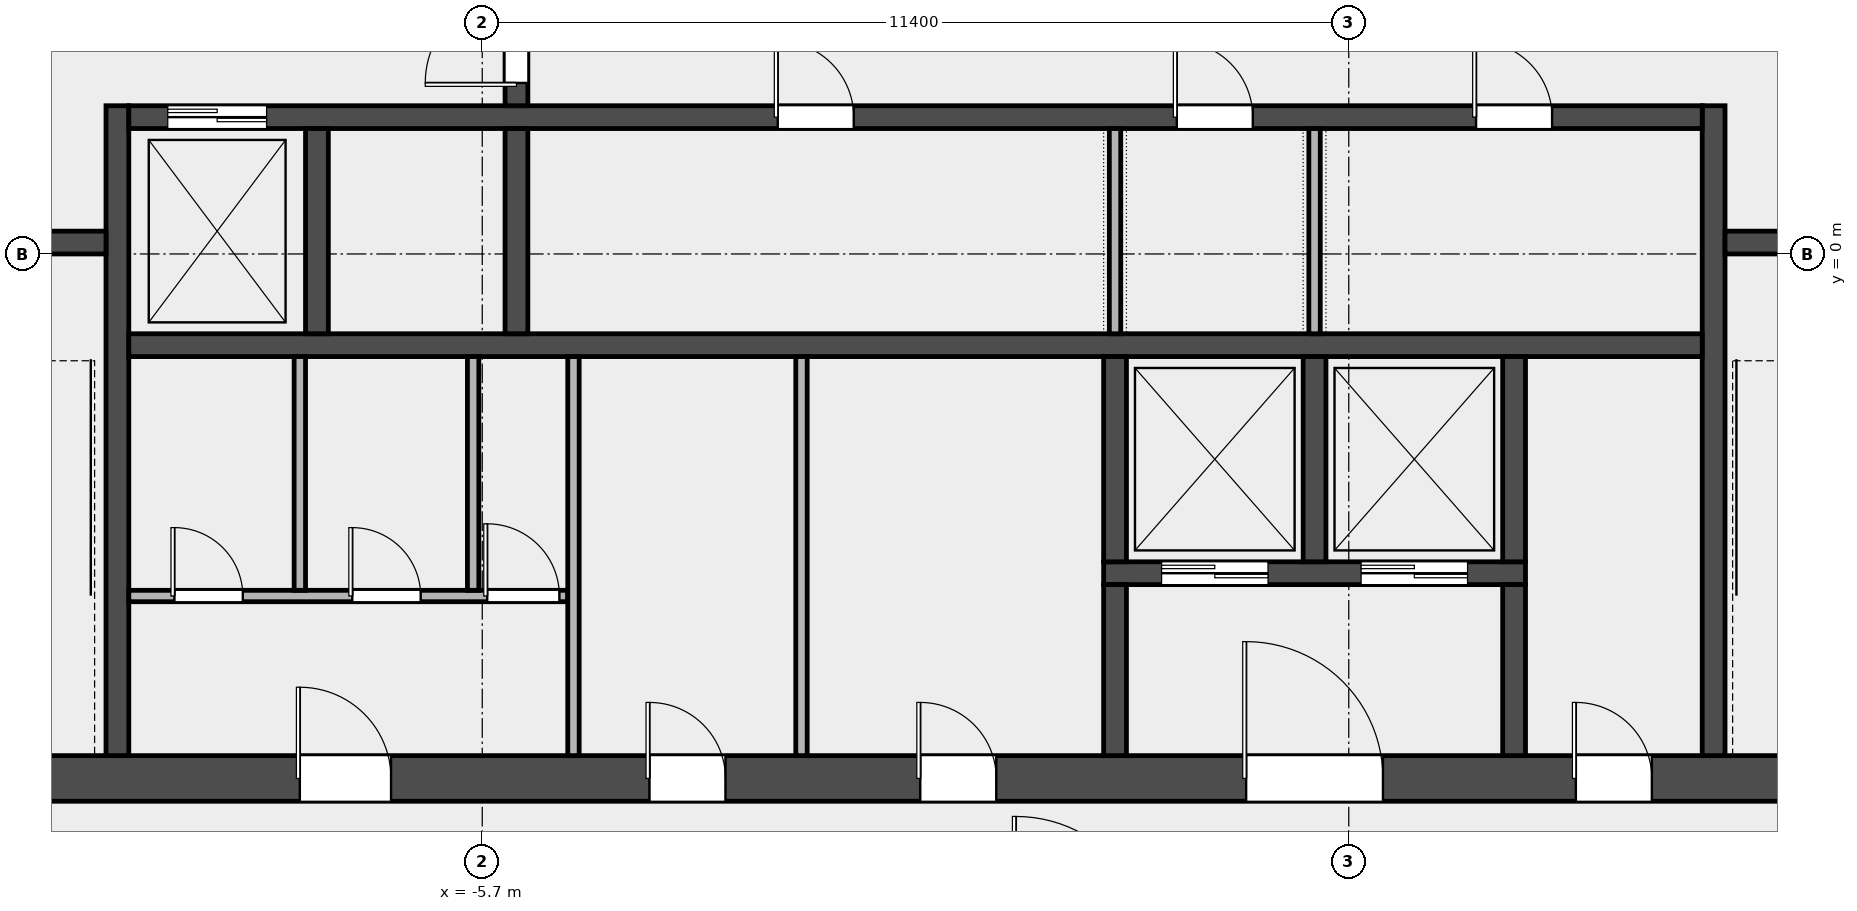
"""IFC4 building model, lengths in metres.
Left out: names, types, materials, properties, quantities, classifications, styles, units other than length and angle.
Written with IfcOpenShell. Run it as: python <this file> out.ifc"""

import sys

from ifc_helpers import new_model, si_unit, direction, frame, frame_2d, origin, place, context, subcontext, project, spatial, rectangle, extrude, element, fill, save


model = new_model("IFC4")
c1 = context("Model", 3, precision=1e-05, world=origin(), true_north=direction((0.0, 1.0)))
c2 = subcontext(c1, "Body", "Model", "MODEL_VIEW")
j1 = project(units=[si_unit("LENGTHUNIT", "METRE"), si_unit("PLANEANGLEUNIT", "RADIAN")], contexts=[c1])
p1 = place(None, origin())
s1 = spatial("IfcSite", under=j1, at=p1, CompositionType="ELEMENT")
p2 = place(p1, origin())
s2 = spatial("IfcBuilding", under=s1, at=p2, CompositionType="ELEMENT")
p3 = place(p2, frame((0.0, 0.0, 251.0)))
s3 = spatial("IfcBuildingStorey", under=s2, at=p3, CompositionType="ELEMENT", Elevation=251.0)
p4 = place(p3, frame((-14.4, -6.9, 0.0), z_axis=(0.0, 0.0, 1.0), x_axis=(1.0, 0.0, 0.0)))
e1 = element("IfcWall", 1, at=p4, inside=s3, PredefinedType="SHEAR", context=c2, shape_type="SweptSolid", body=[
    extrude(rectangle(XDim=28.8, YDim=0.6, at=frame_2d((14.4, 0.0))), origin(), (0.0, 0.0, 1.0), 3.7),
])
p5 = place(p4, frame((6.3, 0.0, 0.0)))
e2 = element("IfcOpeningElement", 2, at=p5, cuts=e1, PredefinedType="OPENING", context=c2, shape_type="SweptSolid", body=[
    extrude(rectangle(XDim=1.2, YDim=2.1, at=frame_2d((0.6, 1.05))), frame((0.0, 0.312, 0.0), z_axis=(0.0, -1.0, 0.0), x_axis=(1.0, 0.0, 0.0)), (0.0, 0.0, 1.0), 0.624),
])
p6 = place(p4, frame((10.9, 0.0, 0.0)))
e3 = element("IfcOpeningElement", 3, at=p6, cuts=e1, PredefinedType="OPENING", context=c2, shape_type="SweptSolid", body=[
    extrude(rectangle(XDim=1.0, YDim=2.1, at=frame_2d((0.5, 1.05))), frame((0.0, 0.312, 0.0), z_axis=(0.0, -1.0, 0.0), x_axis=(1.0, 0.0, 0.0)), (0.0, 0.0, 1.0), 0.624),
])
p7 = place(p4, frame((14.462, 0.0, 0.0)))
e4 = element("IfcOpeningElement", 4, at=p7, cuts=e1, PredefinedType="OPENING", context=c2, shape_type="SweptSolid", body=[
    extrude(rectangle(XDim=1.0, YDim=2.1, at=frame_2d((0.5, 1.05))), frame((0.0, 0.312, 0.0), z_axis=(0.0, -1.0, 0.0), x_axis=(1.0, 0.0, 0.0)), (0.0, 0.0, 1.0), 0.624),
])
p8 = place(p4, frame((18.75, 0.0, 0.0)))
e5 = element("IfcOpeningElement", 5, at=p8, cuts=e1, PredefinedType="OPENING", context=c2, shape_type="SweptSolid", body=[
    extrude(rectangle(XDim=1.8, YDim=2.1, at=frame_2d((0.9, 1.05))), frame((0.0, 0.312, 0.0), z_axis=(0.0, -1.0, 0.0), x_axis=(1.0, 0.0, 0.0)), (0.0, 0.0, 1.0), 0.624),
])
p9 = place(p4, frame((23.087, 0.0, 0.0)))
e6 = element("IfcOpeningElement", 6, at=p9, cuts=e1, PredefinedType="OPENING", context=c2, shape_type="SweptSolid", body=[
    extrude(rectangle(XDim=1.0, YDim=2.1, at=frame_2d((0.5, 1.05))), frame((0.0, 0.312, 0.0), z_axis=(0.0, -1.0, 0.0), x_axis=(1.0, 0.0, 0.0)), (0.0, 0.0, 1.0), 0.624),
])
for number, where, z_axis, x_axis in (
    (7, (-10.5, -6.6, 0.0), (0.0, 0.0, 1.0), (0.0, 1.0, 0.0)),
    (8, (10.5, -6.6, 0.0), (0.0, 0.0, 1.0), (0.0, 1.0, 0.0)),
):
    element("IfcWall", number, at=place(p3, frame(where, z_axis=z_axis, x_axis=x_axis)), inside=s3, PredefinedType="SHEAR", context=c2, shape_type="SweptSolid", body=[
        extrude(rectangle(XDim=8.55, YDim=0.3, at=frame_2d((4.275, 0.0))), origin(), (0.0, 0.0, 1.0), 3.7),
    ])
p10 = place(p3, frame((-13.8, 0.15, 0.0), z_axis=(0.0, 0.0, 1.0), x_axis=(1.0, 0.0, 0.0)))
e9 = element("IfcWall", 9, at=p10, inside=s3, PredefinedType="SOLIDWALL", context=c2, shape_type="SweptSolid", body=[
    extrude(rectangle(XDim=3.15, YDim=0.3, at=frame_2d((1.575, 0.0))), origin(), (0.0, 0.0, 1.0), 3.7),
])
p11 = place(p10, frame((0.975, 0.0, 0.0)))
e10 = element("IfcOpeningElement", 10, at=p11, cuts=e9, PredefinedType="OPENING", context=c2, shape_type="SweptSolid", body=[
    extrude(rectangle(XDim=1.1, YDim=2.1, at=frame_2d((0.55, 1.05))), frame((0.0, 0.162, 0.0), z_axis=(0.0, -1.0, 0.0), x_axis=(1.0, 0.0, 0.0)), (0.0, 0.0, 1.0), 0.324),
])
p12 = place(p3, frame((10.65, 0.15, 0.0), z_axis=(0.0, 0.0, 1.0), x_axis=(1.0, 0.0, 0.0)))
e11 = element("IfcWall", 11, at=p12, inside=s3, PredefinedType="SOLIDWALL", context=c2, shape_type="SweptSolid", body=[
    extrude(rectangle(XDim=3.15, YDim=0.3, at=frame_2d((1.575, 0.0))), origin(), (0.0, 0.0, 1.0), 3.7),
])
p13 = place(p12, frame((1.025, 0.0, 0.0)))
e12 = element("IfcOpeningElement", 12, at=p13, cuts=e11, PredefinedType="OPENING", context=c2, shape_type="SweptSolid", body=[
    extrude(rectangle(XDim=1.1, YDim=2.1, at=frame_2d((0.55, 1.05))), frame((0.0, 0.162, 0.0), z_axis=(0.0, -1.0, 0.0), x_axis=(1.0, 0.0, 0.0)), (0.0, 0.0, 1.0), 0.324),
])
p14 = place(p3, frame((-10.35, -1.2, 0.0), z_axis=(0.0, 0.0, 1.0), x_axis=(1.0, 0.0, 0.0)))
e13 = element("IfcWall", 13, at=p14, inside=s3, PredefinedType="SOLIDWALL", context=c2, shape_type="SweptSolid", body=[
    extrude(rectangle(XDim=20.7, YDim=0.3, at=frame_2d((10.35, 0.0))), origin(), (0.0, 0.0, 1.0), 3.7),
])
p15 = place(p3, frame((-10.35, 1.8, 0.0), z_axis=(0.0, 0.0, 1.0), x_axis=(1.0, 0.0, 0.0)))
e14 = element("IfcWall", 14, at=p15, inside=s3, PredefinedType="SOLIDWALL", context=c2, shape_type="SweptSolid", body=[
    extrude(rectangle(XDim=20.7, YDim=0.3, at=frame_2d((10.35, 0.0))), origin(), (0.0, 0.0, 1.0), 3.7),
])
p16 = place(p15, frame((0.512, 0.0, 0.0)))
e15 = element("IfcOpeningElement", 15, at=p16, cuts=e14, PredefinedType="OPENING", context=c2, shape_type="SweptSolid", body=[
    extrude(rectangle(XDim=1.3, YDim=2.1, at=frame_2d((0.65, 1.05))), frame((0.0, 0.162, 0.0), z_axis=(0.0, -1.0, 0.0), x_axis=(1.0, 0.0, 0.0)), (0.0, 0.0, 1.0), 0.324),
])
p17 = place(p15, frame((8.538, 0.0, 0.0)))
e16 = element("IfcOpeningElement", 16, at=p17, cuts=e14, PredefinedType="OPENING", context=c2, shape_type="SweptSolid", body=[
    extrude(rectangle(XDim=1.0, YDim=2.1, at=frame_2d((0.5, 1.05))), frame((0.0, 0.162, 0.0), z_axis=(0.0, -1.0, 0.0), x_axis=(1.0, 0.0, 0.0)), (0.0, 0.0, 1.0), 0.324),
])
p18 = place(p15, frame((13.788, 0.0, 0.0)))
e17 = element("IfcOpeningElement", 17, at=p18, cuts=e14, PredefinedType="OPENING", context=c2, shape_type="SweptSolid", body=[
    extrude(rectangle(XDim=1.0, YDim=2.1, at=frame_2d((0.5, 1.05))), frame((0.0, 0.162, 0.0), z_axis=(0.0, -1.0, 0.0), x_axis=(1.0, 0.0, 0.0)), (0.0, 0.0, 1.0), 0.324),
])
p19 = place(p15, frame((17.725, 0.0, 0.0)))
e18 = element("IfcOpeningElement", 18, at=p19, cuts=e14, PredefinedType="OPENING", context=c2, shape_type="SweptSolid", body=[
    extrude(rectangle(XDim=1.0, YDim=2.1, at=frame_2d((0.5, 1.05))), frame((0.0, 0.162, 0.0), z_axis=(0.0, -1.0, 0.0), x_axis=(1.0, 0.0, 0.0)), (0.0, 0.0, 1.0), 0.324),
])
for number, where, z_axis, x_axis in (
    (19, (-7.875, -1.05, 0.0), (0.0, 0.0, 1.0), (0.0, 1.0, 0.0)),
    (20, (-5.25, -1.05, 0.0), (0.0, 0.0, 1.0), (0.0, 1.0, 0.0)),
):
    element("IfcWall", number, at=place(p3, frame(where, z_axis=z_axis, x_axis=x_axis)), inside=s3, PredefinedType="SOLIDWALL", context=c2, shape_type="SweptSolid", body=[
        extrude(rectangle(XDim=2.7, YDim=0.3, at=frame_2d((1.35, 0.0))), origin(), (0.0, 0.0, 1.0), 3.7),
    ])
p20 = place(p3, frame((-5.25, 1.95, 0.0), z_axis=(0.0, 0.0, 1.0), x_axis=(0.0, 1.0, 0.0)))
e21 = element("IfcWall", 21, at=p20, inside=s3, PredefinedType="SOLIDWALL", context=c2, shape_type="SweptSolid", body=[
    extrude(rectangle(XDim=3.3, YDim=0.3, at=frame_2d((1.65, 0.0))), origin(), (0.0, 0.0, 1.0), 3.7),
])
p21 = place(p20, frame((0.3, 0.0, 0.0)))
e22 = element("IfcOpeningElement", 22, at=p21, cuts=e21, PredefinedType="OPENING", context=c2, shape_type="SweptSolid", body=[
    extrude(rectangle(XDim=1.2, YDim=2.1, at=frame_2d((0.6, 1.05))), frame((0.0, 0.162, 0.0), z_axis=(0.0, -1.0, 0.0), x_axis=(1.0, 0.0, 0.0)), (0.0, 0.0, 1.0), 0.324),
])
p22 = place(p20, frame((1.8, 0.0, 0.0)))
e23 = element("IfcOpeningElement", 23, at=p22, cuts=e21, PredefinedType="OPENING", context=c2, shape_type="SweptSolid", body=[
    extrude(rectangle(XDim=1.2, YDim=2.1, at=frame_2d((0.6, 1.05))), frame((0.0, 0.162, 0.0), z_axis=(0.0, -1.0, 0.0), x_axis=(1.0, 0.0, 0.0)), (0.0, 0.0, 1.0), 0.324),
])
p23 = place(p3, frame((2.475, -4.2, 0.0), z_axis=(0.0, 0.0, 1.0), x_axis=(1.0, 0.0, 0.0)))
e24 = element("IfcWall", 24, at=p23, inside=s3, PredefinedType="SOLIDWALL", context=c2, shape_type="SweptSolid", body=[
    extrude(rectangle(XDim=5.55, YDim=0.3, at=frame_2d((2.775, 0.0))), origin(), (0.0, 0.0, 1.0), 3.7),
])
p24 = place(p23, frame((0.762, 0.0, 0.0)))
e25 = element("IfcOpeningElement", 25, at=p24, cuts=e24, PredefinedType="OPENING", context=c2, shape_type="SweptSolid", body=[
    extrude(rectangle(XDim=1.4, YDim=2.1, at=frame_2d((0.7, 1.05))), frame((0.0, 0.162, 0.0), z_axis=(0.0, -1.0, 0.0), x_axis=(1.0, 0.0, 0.0)), (0.0, 0.0, 1.0), 0.324),
])
p25 = place(p23, frame((3.387, 0.0, 0.0)))
e26 = element("IfcOpeningElement", 26, at=p25, cuts=e24, PredefinedType="OPENING", context=c2, shape_type="SweptSolid", body=[
    extrude(rectangle(XDim=1.4, YDim=2.1, at=frame_2d((0.7, 1.05))), frame((0.0, 0.162, 0.0), z_axis=(0.0, -1.0, 0.0), x_axis=(1.0, 0.0, 0.0)), (0.0, 0.0, 1.0), 0.324),
])
p26 = place(p3, frame((2.625, -4.05, 0.0), z_axis=(0.0, 0.0, 1.0), x_axis=(0.0, 1.0, 0.0)))
e27 = element("IfcWall", 27, at=p26, inside=s3, PredefinedType="SOLIDWALL", context=c2, shape_type="SweptSolid", body=[
    extrude(rectangle(XDim=2.7, YDim=0.3, at=frame_2d((1.35, 0.0))), origin(), (0.0, 0.0, 1.0), 3.7),
])
p27 = place(p3, frame((2.625, -6.6, 0.0), z_axis=(0.0, 0.0, 1.0), x_axis=(0.0, 1.0, 0.0)))
e28 = element("IfcWall", 28, at=p27, inside=s3, PredefinedType="SOLIDWALL", context=c2, shape_type="SweptSolid", body=[
    extrude(rectangle(XDim=2.25, YDim=0.3, at=frame_2d((1.125, 0.0))), origin(), (0.0, 0.0, 1.0), 3.7),
])
for number, where, z_axis, x_axis in (
    (29, (5.25, -4.05, 0.0), (0.0, 0.0, 1.0), (0.0, 1.0, 0.0)),
    (30, (7.875, -4.05, 0.0), (0.0, 0.0, 1.0), (0.0, 1.0, 0.0)),
):
    element("IfcWall", number, at=place(p3, frame(where, z_axis=z_axis, x_axis=x_axis)), inside=s3, PredefinedType="SOLIDWALL", context=c2, shape_type="SweptSolid", body=[
        extrude(rectangle(XDim=2.7, YDim=0.3, at=frame_2d((1.35, 0.0))), origin(), (0.0, 0.0, 1.0), 3.7),
    ])
p28 = place(p3, frame((7.875, -6.6, 0.0), z_axis=(0.0, 0.0, 1.0), x_axis=(0.0, 1.0, 0.0)))
e31 = element("IfcWall", 31, at=p28, inside=s3, PredefinedType="SOLIDWALL", context=c2, shape_type="SweptSolid", body=[
    extrude(rectangle(XDim=2.25, YDim=0.3, at=frame_2d((1.125, 0.0))), origin(), (0.0, 0.0, 1.0), 3.7),
])
p29 = place(p3, frame((-10.35, -4.5, 0.0), z_axis=(0.0, 0.0, 1.0), x_axis=(1.0, 0.0, 0.0)))
e32 = element("IfcWall", 32, at=p29, inside=s3, PredefinedType="PARTITIONING", context=c2, shape_type="SweptSolid", body=[
    extrude(rectangle(XDim=5.775, YDim=0.15, at=frame_2d((2.888, 0.0))), origin(), (0.0, 0.0, 1.0), 3.7),
])
p30 = place(p29, frame((0.6, 0.0, 0.0)))
e33 = element("IfcOpeningElement", 33, at=p30, cuts=e32, PredefinedType="OPENING", context=c2, shape_type="SweptSolid", body=[
    extrude(rectangle(XDim=0.9, YDim=2.1, at=frame_2d((0.45, 1.05))), frame((0.0, 0.087, 0.0), z_axis=(0.0, -1.0, 0.0), x_axis=(1.0, 0.0, 0.0)), (0.0, 0.0, 1.0), 0.174),
])
p31 = place(p29, frame((2.94, 0.0, 0.0)))
e34 = element("IfcOpeningElement", 34, at=p31, cuts=e32, PredefinedType="OPENING", context=c2, shape_type="SweptSolid", body=[
    extrude(rectangle(XDim=0.9, YDim=2.1, at=frame_2d((0.45, 1.05))), frame((0.0, 0.087, 0.0), z_axis=(0.0, -1.0, 0.0), x_axis=(1.0, 0.0, 0.0)), (0.0, 0.0, 1.0), 0.174),
])
p32 = place(p29, frame((4.715, 0.0, 0.0)))
e35 = element("IfcOpeningElement", 35, at=p32, cuts=e32, PredefinedType="OPENING", context=c2, shape_type="SweptSolid", body=[
    extrude(rectangle(XDim=0.95, YDim=2.1, at=frame_2d((0.475, 1.05))), frame((0.0, 0.087, 0.0), z_axis=(0.0, -1.0, 0.0), x_axis=(1.0, 0.0, 0.0)), (0.0, 0.0, 1.0), 0.174),
])
for number, where, z_axis, x_axis in (
    (36, (-8.1, -4.425, 0.0), (0.0, 0.0, 1.0), (0.0, 1.0, 0.0)),
    (37, (-5.82, -4.425, 0.0), (0.0, 0.0, 1.0), (0.0, 1.0, 0.0)),
):
    element("IfcWall", number, at=place(p3, frame(where, z_axis=z_axis, x_axis=x_axis)), inside=s3, PredefinedType="PARTITIONING", context=c2, shape_type="SweptSolid", body=[
        extrude(rectangle(XDim=3.075, YDim=0.15, at=frame_2d((1.538, 0.0))), origin(), (0.0, 0.0, 1.0), 3.7),
    ])
for number, where, z_axis, x_axis in (
    (38, (-4.5, -6.6, 0.0), (0.0, 0.0, 1.0), (0.0, 1.0, 0.0)),
    (39, (-1.5, -6.6, 0.0), (0.0, 0.0, 1.0), (0.0, 1.0, 0.0)),
):
    element("IfcWall", number, at=place(p3, frame(where, z_axis=z_axis, x_axis=x_axis)), inside=s3, PredefinedType="PARTITIONING", context=c2, shape_type="SweptSolid", body=[
        extrude(rectangle(XDim=5.25, YDim=0.15, at=frame_2d((2.625, 0.0))), origin(), (0.0, 0.0, 1.0), 3.7),
    ])
for number, where, z_axis, x_axis in (
    (40, (2.625, -1.05, 0.0), (0.0, 0.0, 1.0), (0.0, 1.0, 0.0)),
    (41, (5.25, -1.05, 0.0), (0.0, 0.0, 1.0), (0.0, 1.0, 0.0)),
):
    element("IfcWall", number, at=place(p3, frame(where, z_axis=z_axis, x_axis=x_axis)), inside=s3, PredefinedType="PARTITIONING", context=c2, shape_type="SweptSolid", body=[
        extrude(rectangle(XDim=2.7, YDim=0.15, at=frame_2d((1.35, 0.0))), origin(), (0.0, 0.0, 1.0), 3.7),
    ])
p33 = place(p21, origin())
e42 = element("IfcDoor", 42, at=p33, inside=s3, OperationType="SINGLE_SWING_LEFT", PredefinedType="DOOR", context=c2, shape_type="SweptSolid", body=[
    extrude(rectangle(XDim=1.2, YDim=2.1, at=frame_2d((0.6, 1.05))), frame((0.0, 0.025, 0.0), z_axis=(0.0, -1.0, 0.0), x_axis=(1.0, 0.0, 0.0)), (0.0, 0.0, 1.0), 0.05),
])
fill(e22, e42)
p34 = place(p16, origin())
e43 = element("IfcDoor", 43, at=p34, inside=s3, OperationType="DOUBLE_DOOR_SLIDING", PredefinedType="DOOR", context=c2, shape_type="SweptSolid", body=[
    extrude(rectangle(XDim=1.3, YDim=2.1, at=frame_2d((0.65, 1.05))), frame((0.0, 0.025, 0.0), z_axis=(0.0, -1.0, 0.0), x_axis=(1.0, 0.0, 0.0)), (0.0, 0.0, 1.0), 0.05),
])
fill(e15, e43)
p35 = place(p24, origin())
e44 = element("IfcDoor", 44, at=p35, inside=s3, OperationType="DOUBLE_DOOR_SLIDING", PredefinedType="DOOR", context=c2, shape_type="SweptSolid", body=[
    extrude(rectangle(XDim=1.4, YDim=2.1, at=frame_2d((0.7, 1.05))), frame((0.0, 0.025, 0.0), z_axis=(0.0, -1.0, 0.0), x_axis=(1.0, 0.0, 0.0)), (0.0, 0.0, 1.0), 0.05),
])
fill(e25, e44)
p36 = place(p25, origin())
e45 = element("IfcDoor", 45, at=p36, inside=s3, OperationType="DOUBLE_DOOR_SLIDING", PredefinedType="DOOR", context=c2, shape_type="SweptSolid", body=[
    extrude(rectangle(XDim=1.4, YDim=2.1, at=frame_2d((0.7, 1.05))), frame((0.0, 0.025, 0.0), z_axis=(0.0, -1.0, 0.0), x_axis=(1.0, 0.0, 0.0)), (0.0, 0.0, 1.0), 0.05),
])
fill(e26, e45)
p37 = place(p5, origin())
e46 = element("IfcDoor", 46, at=p37, inside=s3, OperationType="SINGLE_SWING_LEFT", PredefinedType="DOOR", context=c2, shape_type="SweptSolid", body=[
    extrude(rectangle(XDim=1.2, YDim=2.1, at=frame_2d((0.6, 1.05))), frame((0.0, 0.025, 0.0), z_axis=(0.0, -1.0, 0.0), x_axis=(1.0, 0.0, 0.0)), (0.0, 0.0, 1.0), 0.05),
])
fill(e2, e46)
p38 = place(p30, origin())
e47 = element("IfcDoor", 47, at=p38, inside=s3, OperationType="SINGLE_SWING_LEFT", PredefinedType="DOOR", context=c2, shape_type="SweptSolid", body=[
    extrude(rectangle(XDim=0.9, YDim=2.1, at=frame_2d((0.45, 1.05))), frame((0.0, 0.025, 0.0), z_axis=(0.0, -1.0, 0.0), x_axis=(1.0, 0.0, 0.0)), (0.0, 0.0, 1.0), 0.05),
])
fill(e33, e47)
p39 = place(p31, origin())
e48 = element("IfcDoor", 48, at=p39, inside=s3, OperationType="SINGLE_SWING_LEFT", PredefinedType="DOOR", context=c2, shape_type="SweptSolid", body=[
    extrude(rectangle(XDim=0.9, YDim=2.1, at=frame_2d((0.45, 1.05))), frame((0.0, 0.025, 0.0), z_axis=(0.0, -1.0, 0.0), x_axis=(1.0, 0.0, 0.0)), (0.0, 0.0, 1.0), 0.05),
])
fill(e34, e48)
p40 = place(p32, origin())
e49 = element("IfcDoor", 49, at=p40, inside=s3, OperationType="SINGLE_SWING_LEFT", PredefinedType="DOOR", context=c2, shape_type="SweptSolid", body=[
    extrude(rectangle(XDim=0.95, YDim=2.1, at=frame_2d((0.475, 1.05))), frame((0.0, 0.025, 0.0), z_axis=(0.0, -1.0, 0.0), x_axis=(1.0, 0.0, 0.0)), (0.0, 0.0, 1.0), 0.05),
])
fill(e35, e49)
p41 = place(p6, origin())
e50 = element("IfcDoor", 50, at=p41, inside=s3, OperationType="SINGLE_SWING_LEFT", PredefinedType="DOOR", context=c2, shape_type="SweptSolid", body=[
    extrude(rectangle(XDim=1.0, YDim=2.1, at=frame_2d((0.5, 1.05))), frame((0.0, 0.025, 0.0), z_axis=(0.0, -1.0, 0.0), x_axis=(1.0, 0.0, 0.0)), (0.0, 0.0, 1.0), 0.05),
])
fill(e3, e50)
p42 = place(p7, origin())
e51 = element("IfcDoor", 51, at=p42, inside=s3, OperationType="SINGLE_SWING_LEFT", PredefinedType="DOOR", context=c2, shape_type="SweptSolid", body=[
    extrude(rectangle(XDim=1.0, YDim=2.1, at=frame_2d((0.5, 1.05))), frame((0.0, 0.025, 0.0), z_axis=(0.0, -1.0, 0.0), x_axis=(1.0, 0.0, 0.0)), (0.0, 0.0, 1.0), 0.05),
])
fill(e4, e51)
p43 = place(p8, origin())
e52 = element("IfcDoor", 52, at=p43, inside=s3, OperationType="DOUBLE_DOOR_SINGLE_SWING", PredefinedType="DOOR", context=c2, shape_type="SweptSolid", body=[
    extrude(rectangle(XDim=1.8, YDim=2.1, at=frame_2d((0.9, 1.05))), frame((0.0, 0.025, 0.0), z_axis=(0.0, -1.0, 0.0), x_axis=(1.0, 0.0, 0.0)), (0.0, 0.0, 1.0), 0.05),
])
fill(e5, e52)
p44 = place(p9, origin())
e53 = element("IfcDoor", 53, at=p44, inside=s3, OperationType="SINGLE_SWING_LEFT", PredefinedType="DOOR", context=c2, shape_type="SweptSolid", body=[
    extrude(rectangle(XDim=1.0, YDim=2.1, at=frame_2d((0.5, 1.05))), frame((0.0, 0.025, 0.0), z_axis=(0.0, -1.0, 0.0), x_axis=(1.0, 0.0, 0.0)), (0.0, 0.0, 1.0), 0.05),
])
fill(e6, e53)
p45 = place(p17, origin())
e54 = element("IfcDoor", 54, at=p45, inside=s3, OperationType="SINGLE_SWING_LEFT", PredefinedType="DOOR", context=c2, shape_type="SweptSolid", body=[
    extrude(rectangle(XDim=1.0, YDim=2.1, at=frame_2d((0.5, 1.05))), frame((0.0, 0.025, 0.0), z_axis=(0.0, -1.0, 0.0), x_axis=(1.0, 0.0, 0.0)), (0.0, 0.0, 1.0), 0.05),
])
fill(e16, e54)
p46 = place(p18, origin())
e55 = element("IfcDoor", 55, at=p46, inside=s3, OperationType="SINGLE_SWING_LEFT", PredefinedType="DOOR", context=c2, shape_type="SweptSolid", body=[
    extrude(rectangle(XDim=1.0, YDim=2.1, at=frame_2d((0.5, 1.05))), frame((0.0, 0.025, 0.0), z_axis=(0.0, -1.0, 0.0), x_axis=(1.0, 0.0, 0.0)), (0.0, 0.0, 1.0), 0.05),
])
fill(e17, e55)
p47 = place(p19, origin())
e56 = element("IfcDoor", 56, at=p47, inside=s3, OperationType="SINGLE_SWING_LEFT", PredefinedType="DOOR", context=c2, shape_type="SweptSolid", body=[
    extrude(rectangle(XDim=1.0, YDim=2.1, at=frame_2d((0.5, 1.05))), frame((0.0, 0.025, 0.0), z_axis=(0.0, -1.0, 0.0), x_axis=(1.0, 0.0, 0.0)), (0.0, 0.0, 1.0), 0.05),
])
fill(e18, e56)
save(model, sys.argv[1])
